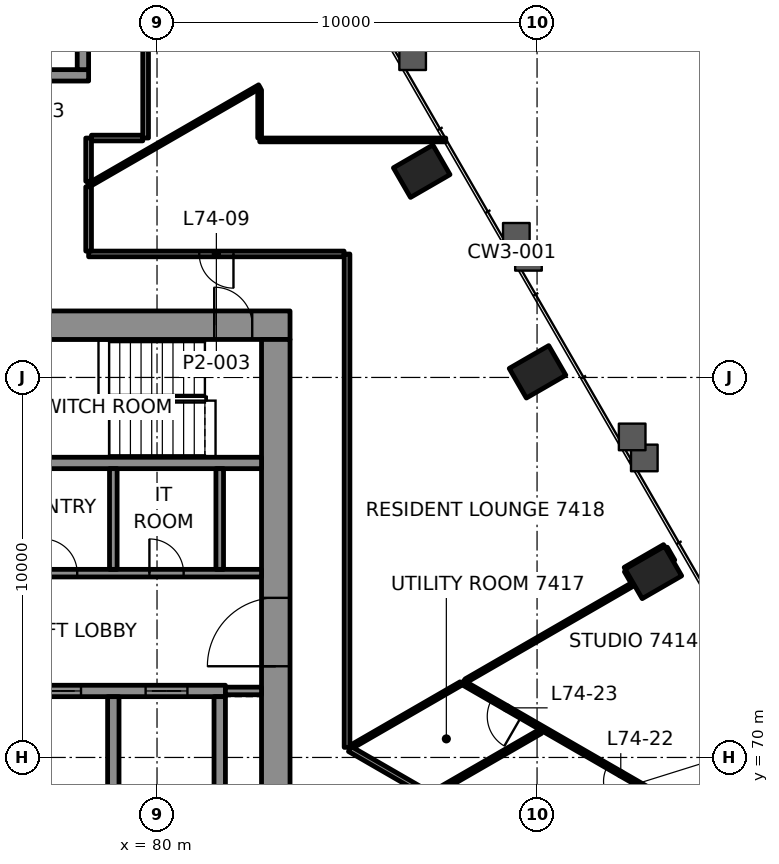
"""IFC4 building model, lengths in metres.
Left out: names, types, materials, properties, quantities, classifications, styles, units other than length and angle.
Written with IfcOpenShell. Run it as: python <this file> out.ifc"""

import sys

from ifc_helpers import new_model, si_unit, direction, frame, frame_2d, origin, origin_2d, place, context, subcontext, project, spatial, rectangle, hollow_rectangle, extrude, element, fill, save


model = new_model("IFC4")
c1 = context("Model", 3, precision=1e-05, world=origin(), true_north=direction((0.0, 1.0)))
c2 = subcontext(c1, "Body", "Model", "MODEL_VIEW")
j1 = project(units=[si_unit("LENGTHUNIT", "METRE"), si_unit("PLANEANGLEUNIT", "RADIAN")], contexts=[c1])
p1 = place(None, origin())
s1 = spatial("IfcSite", under=j1, at=p1, CompositionType="ELEMENT")
p2 = place(p1, origin())
s2 = spatial("IfcBuilding", under=s1, at=p2, CompositionType="ELEMENT")
p3 = place(p2, frame((0.0, 0.0, 305.6)))
s3 = spatial("IfcBuildingStorey", under=s2, at=p3, CompositionType="ELEMENT", Elevation=305.6)
for number, where, z_axis, x_axis in (
    (1, (93.061, 74.869, -0.0), (0.0, 0.0, 1.0), (-0.5, 0.866, 0.0)),
    (2, (90.013, 80.148, -0.0), (0.0, 0.0, 1.0), (-0.5, 0.866, 0.0)),
    (3, (86.965, 85.427, -0.0), (0.0, 0.0, 1.0), (-0.5, 0.866, 0.0)),
):
    element("IfcColumn", number, at=place(p3, frame(where, z_axis=z_axis, x_axis=x_axis)), inside=s3, PredefinedType="COLUMN", context=c2, shape_type="SweptSolid", body=[
        extrude(hollow_rectangle(XDim=0.9, YDim=1.2, WallThickness=0.06, at=origin_2d()), origin(), (0.0, 0.0, 1.0), 3.5),
    ])
p4 = place(p3, frame((66.5, 81.375, 0.0), z_axis=(0.0, 0.0, 1.0), x_axis=(1.0, 0.0, 0.0)))
e4 = element("IfcWall", 4, at=p4, inside=s3, PredefinedType="SHEAR", context=c2, shape_type="SweptSolid", body=[
    extrude(rectangle(XDim=17.0, YDim=0.75, at=frame_2d((8.5, 0.0))), origin(), (0.0, 0.0, 1.0), 3.3),
])
p5 = place(p4, frame((1.195, 0.0, 0.0)))
e5 = element("IfcOpeningElement", 5, at=p5, cuts=e4, PredefinedType="OPENING", context=c2, shape_type="SweptSolid", body=[
    extrude(rectangle(XDim=1.0, YDim=2.1, at=frame_2d((0.5, 1.05))), frame((0.0, 0.385, 0.0), z_axis=(0.0, -1.0, 0.0), x_axis=(1.0, 0.0, 0.0)), (0.0, 0.0, 1.0), 0.77),
])
p6 = place(p4, frame((15.005, 0.0, 0.0)))
e6 = element("IfcOpeningElement", 6, at=p6, cuts=e4, PredefinedType="OPENING", context=c2, shape_type="SweptSolid", body=[
    extrude(rectangle(XDim=1.0, YDim=2.1, at=frame_2d((0.5, 1.05))), frame((0.0, 0.385, 0.0), z_axis=(0.0, -1.0, 0.0), x_axis=(1.0, 0.0, 0.0)), (0.0, 0.0, 1.0), 0.77),
])
p7 = place(p4, frame((8.15, 0.0, 0.0)))
e7 = element("IfcOpeningElement", 7, at=p7, cuts=e4, PredefinedType="OPENING", context=c2, shape_type="SweptSolid", body=[
    extrude(rectangle(XDim=0.9, YDim=2.1, at=frame_2d((0.45, 1.05))), frame((0.0, 0.385, 0.0), z_axis=(0.0, -1.0, 0.0), x_axis=(1.0, 0.0, 0.0)), (0.0, 0.0, 1.0), 0.77),
])
p8 = place(p3, frame((83.125, 69.0, 0.0), z_axis=(0.0, 0.0, 1.0), x_axis=(0.0, 1.0, 0.0)))
e8 = element("IfcWall", 8, at=p8, inside=s3, PredefinedType="SHEAR", context=c2, shape_type="SweptSolid", body=[
    extrude(rectangle(XDim=12.0, YDim=0.75, at=frame_2d((6.0, 0.0))), origin(), (0.0, 0.0, 1.0), 3.3),
])
p9 = place(p8, frame((3.4, 0.0, 0.0)))
e9 = element("IfcOpeningElement", 9, at=p9, cuts=e8, PredefinedType="OPENING", context=c2, shape_type="SweptSolid", body=[
    extrude(rectangle(XDim=1.8, YDim=2.1, at=frame_2d((0.9, 1.05))), frame((0.0, 0.385, 0.0), z_axis=(0.0, -1.0, 0.0), x_axis=(1.0, 0.0, 0.0)), (0.0, 0.0, 1.0), 0.77),
])
p10 = place(p3, frame((70.3, 71.75, 0.0), z_axis=(0.0, 0.0, 1.0), x_axis=(1.0, 0.0, 0.0)))
e10 = element("IfcWall", 10, at=p10, inside=s3, PredefinedType="SHEAR", context=c2, shape_type="SweptSolid", body=[
    extrude(rectangle(XDim=11.5, YDim=0.3, at=frame_2d((5.75, 0.0))), origin(), (0.0, 0.0, 1.0), 3.3),
])
p11 = place(p10, frame((1.0, 0.0, 0.0)))
e11 = element("IfcOpeningElement", 11, at=p11, cuts=e10, PredefinedType="OPENING", context=c2, shape_type="SweptSolid", body=[
    extrude(rectangle(XDim=1.1, YDim=2.1, at=frame_2d((0.55, 1.05))), frame((0.0, 0.16, 0.0), z_axis=(0.0, -1.0, 0.0), x_axis=(1.0, 0.0, 0.0)), (0.0, 0.0, 1.0), 0.32),
])
p12 = place(p10, frame((3.8, 0.0, 0.0)))
e12 = element("IfcOpeningElement", 12, at=p12, cuts=e10, PredefinedType="OPENING", context=c2, shape_type="SweptSolid", body=[
    extrude(rectangle(XDim=1.1, YDim=2.1, at=frame_2d((0.55, 1.05))), frame((0.0, 0.16, 0.0), z_axis=(0.0, -1.0, 0.0), x_axis=(1.0, 0.0, 0.0)), (0.0, 0.0, 1.0), 0.32),
])
p13 = place(p10, frame((6.6, 0.0, 0.0)))
e13 = element("IfcOpeningElement", 13, at=p13, cuts=e10, PredefinedType="OPENING", context=c2, shape_type="SweptSolid", body=[
    extrude(rectangle(XDim=1.1, YDim=2.1, at=frame_2d((0.55, 1.05))), frame((0.0, 0.16, 0.0), z_axis=(0.0, -1.0, 0.0), x_axis=(1.0, 0.0, 0.0)), (0.0, 0.0, 1.0), 0.32),
])
p14 = place(p10, frame((9.4, 0.0, 0.0)))
e14 = element("IfcOpeningElement", 14, at=p14, cuts=e10, PredefinedType="OPENING", context=c2, shape_type="SweptSolid", body=[
    extrude(rectangle(XDim=1.1, YDim=2.1, at=frame_2d((0.55, 1.05))), frame((0.0, 0.16, 0.0), z_axis=(0.0, -1.0, 0.0), x_axis=(1.0, 0.0, 0.0)), (0.0, 0.0, 1.0), 0.32),
])
for number, where, z_axis, x_axis in (
    (15, (78.85, 69.0, 0.0), (0.0, 0.0, 1.0), (0.0, 1.0, 0.0)),
    (16, (81.65, 69.0, 0.0), (0.0, 0.0, 1.0), (0.0, 1.0, 0.0)),
):
    element("IfcWall", number, at=place(p3, frame(where, z_axis=z_axis, x_axis=x_axis)), inside=s3, PredefinedType="SHEAR", context=c2, shape_type="SweptSolid", body=[
        extrude(rectangle(XDim=2.6, YDim=0.3, at=frame_2d((1.3, 0.0))), origin(), (0.0, 0.0, 1.0), 3.3),
    ])
p15 = place(p3, frame((67.25, 77.75, 0.0), z_axis=(0.0, 0.0, 1.0), x_axis=(1.0, 0.0, 0.0)))
e17 = element("IfcWall", 17, at=p15, inside=s3, PredefinedType="SHEAR", context=c2, shape_type="SweptSolid", body=[
    extrude(rectangle(XDim=15.5, YDim=0.3, at=frame_2d((7.75, 0.0))), origin(), (0.0, 0.0, 1.0), 3.3),
])
p16 = place(p15, frame((0.445, 0.0, 0.0)))
e18 = element("IfcOpeningElement", 18, at=p16, cuts=e17, PredefinedType="OPENING", context=c2, shape_type="SweptSolid", body=[
    extrude(rectangle(XDim=1.0, YDim=2.1, at=frame_2d((0.5, 1.05))), frame((0.0, 0.16, 0.0), z_axis=(0.0, -1.0, 0.0), x_axis=(1.0, 0.0, 0.0)), (0.0, 0.0, 1.0), 0.32),
])
p17 = place(p3, frame((71.8, 87.95, 0.0), z_axis=(0.0, 0.0, 1.0), x_axis=(1.0, 0.0, 0.0)))
e19 = element("IfcWall", 19, at=p17, inside=s3, PredefinedType="SHEAR", context=c2, shape_type="SweptSolid", body=[
    extrude(rectangle(XDim=6.4, YDim=0.3, at=frame_2d((3.2, 0.0))), origin(), (0.0, 0.0, 1.0), 3.3),
])
p18 = place(p17, frame((1.325, 0.0, 0.0)))
e20 = element("IfcOpeningElement", 20, at=p18, cuts=e19, PredefinedType="OPENING", context=c2, shape_type="SweptSolid", body=[
    extrude(rectangle(XDim=1.0, YDim=2.1, at=frame_2d((0.5, 1.05))), frame((0.0, 0.16, 0.0), z_axis=(0.0, -1.0, 0.0), x_axis=(1.0, 0.0, 0.0)), (0.0, 0.0, 1.0), 0.32),
])
p19 = place(p17, frame((4.125, 0.0, 0.0)))
e21 = element("IfcOpeningElement", 21, at=p19, cuts=e19, PredefinedType="OPENING", context=c2, shape_type="SweptSolid", body=[
    extrude(rectangle(XDim=1.2, YDim=2.1, at=frame_2d((0.6, 1.05))), frame((0.0, 0.16, 0.0), z_axis=(0.0, -1.0, 0.0), x_axis=(1.0, 0.0, 0.0)), (0.0, 0.0, 1.0), 0.32),
])
p20 = place(p3, frame((78.05, 88.1, 0.0), z_axis=(0.0, 0.0, 1.0), x_axis=(0.0, 1.0, 0.0)))
e22 = element("IfcWall", 22, at=p20, inside=s3, PredefinedType="SHEAR", context=c2, shape_type="SweptSolid", body=[
    extrude(rectangle(XDim=6.2, YDim=0.3, at=frame_2d((3.1, 0.0))), origin(), (0.0, 0.0, 1.0), 3.3),
])
p21 = place(p3, frame((84.923, 83.25, 0.0), z_axis=(0.0, 0.0, 1.0), x_axis=(-1.0, 0.0, 0.0)))
e23 = element("IfcWall", 23, at=p21, inside=s3, PredefinedType="PARTITIONING", context=c2, shape_type="SweptSolid", body=[
    extrude(rectangle(XDim=6.723, YDim=0.15, at=frame_2d((3.362, 0.0))), origin(), (0.0, 0.0, 1.0), 2.7),
])
p22 = place(p21, frame((2.911, 0.0, 0.0)))
e24 = element("IfcOpeningElement", 24, at=p22, cuts=e23, PredefinedType="OPENING", context=c2, shape_type="SweptSolid", body=[
    extrude(rectangle(XDim=0.9, YDim=2.1, at=frame_2d((0.45, 1.05))), frame((0.0, 0.085, 0.0), z_axis=(0.0, -1.0, 0.0), x_axis=(1.0, 0.0, 0.0)), (0.0, 0.0, 1.0), 0.17),
])
p23 = place(p3, frame((82.702, 86.25, 0.0), z_axis=(0.0, 0.0, 1.0), x_axis=(1.0, 0.0, 0.0)))
e25 = element("IfcWall", 25, at=p23, inside=s3, PredefinedType="PARTITIONING", context=c2, shape_type="SweptSolid", body=[
    extrude(rectangle(XDim=4.896, YDim=0.1, at=frame_2d((2.448, 0.0))), origin(), (0.0, 0.0, 1.0), 2.688),
])
p24 = place(p3, frame((78.275, 86.3, 0.0), z_axis=(0.0, 0.0, 1.0), x_axis=(1.0, 0.0, 0.0)))
e26 = element("IfcWall", 26, at=p24, inside=s3, PredefinedType="PARTITIONING", context=c2, shape_type="SweptSolid", body=[
    extrude(rectangle(XDim=1.35, YDim=0.15, at=frame_2d((0.675, 0.0))), origin(), (0.0, 0.0, 1.0), 2.7),
])
p25 = place(p3, frame((87.292, 69.069, 0.0), z_axis=(0.0, 0.0, 1.0), x_axis=(0.86605210011, 0.499953757757, 0.0)))
e27 = element("IfcWall", 27, at=p25, inside=s3, PredefinedType="PARTITIONING", context=c2, shape_type="SweptSolid", body=[
    extrude(rectangle(XDim=3.228, YDim=0.12, at=frame_2d((1.614, 0.0))), origin(), (0.0, 0.0, 1.0), 2.7),
])
p26 = place(p3, frame((85.145, 70.299, 0.0), z_axis=(0.0, 0.0, 1.0), x_axis=(0.866032610133, 0.499987518031, 0.0)))
e28 = element("IfcWall", 28, at=p26, inside=s3, PredefinedType="PARTITIONING", context=c2, shape_type="SweptSolid", body=[
    extrude(rectangle(XDim=3.295, YDim=0.1, at=frame_2d((1.648, 0.0))), origin(), (0.0, 0.0, 1.0), 2.7),
])
p27 = place(p3, frame((92.318, 74.959, 0.0), z_axis=(0.0, 0.0, 1.0), x_axis=(0.866087020037, 0.499893262331, 0.0)))
e29 = element("IfcWall", 29, at=p27, inside=s3, PredefinedType="PARTITIONING", context=c2, shape_type="SweptSolid", body=[
    extrude(rectangle(XDim=1.196, YDim=0.1, at=frame_2d((0.598, 0.0))), origin(), (0.0, 0.0, 1.0), 2.688),
])
p28 = place(p3, frame((78.2, 85.06, 0.0), z_axis=(0.0, 0.0, 1.0), x_axis=(0.866025161861, 0.500000419024, 0.0)))
e30 = element("IfcWall", 30, at=p28, inside=s3, PredefinedType="PARTITIONING", context=c2, shape_type="SweptSolid", body=[
    extrude(rectangle(XDim=5.195, YDim=0.1, at=frame_2d((2.598, 0.0))), origin(), (0.0, 0.0, 1.0), 2.7),
])
p29 = place(p3, frame((85.0, 70.266, 0.0), z_axis=(0.0, 0.0, 1.0), x_axis=(0.0, 1.0, 0.0)))
e31 = element("IfcWall", 31, at=p29, inside=s3, PredefinedType="PARTITIONING", context=c2, shape_type="SweptSolid", body=[
    extrude(rectangle(XDim=12.982, YDim=0.15, at=frame_2d((6.491, 0.0))), origin(), (0.0, 0.0, 1.0), 2.7),
])
p30 = place(p3, frame((82.7, 86.302, 0.0), z_axis=(0.0, 0.0, 1.0), x_axis=(0.0, 1.0, 0.0)))
e32 = element("IfcWall", 32, at=p30, inside=s3, PredefinedType="PARTITIONING", context=c2, shape_type="SweptSolid", body=[
    extrude(rectangle(XDim=1.267, YDim=0.1, at=frame_2d((0.634, 0.0))), origin(), (0.0, 0.0, 1.0), 2.7),
])
p31 = place(p3, frame((79.7, 86.301, 0.0), z_axis=(0.0, 0.0, 1.0), x_axis=(0.0, 1.0, 0.0)))
e33 = element("IfcWall", 33, at=p31, inside=s3, PredefinedType="PARTITIONING", context=c2, shape_type="SweptSolid", body=[
    extrude(rectangle(XDim=9.799, YDim=0.15, at=frame_2d((4.899, 0.0))), origin(), (0.0, 0.0, 1.0), 2.7),
])
p32 = place(p3, frame((78.2, 83.325, 0.0), z_axis=(0.0, 0.0, 1.0), x_axis=(0.0, 1.0, 0.0)))
e34 = element("IfcWall", 34, at=p32, inside=s3, PredefinedType="PARTITIONING", context=c2, shape_type="SweptSolid", body=[
    extrude(rectangle(XDim=1.692, YDim=0.15, at=frame_2d((0.846, 0.0))), origin(), (0.0, 0.0, 1.0), 2.7),
])
p33 = place(p3, frame((93.58, 75.169, 0.0), z_axis=(0.0, 0.0, 1.0), x_axis=(-0.500153222552, 0.865936922628, 0.0)))
e35 = element("IfcWall", 35, at=p33, inside=s3, PredefinedType="PARTITIONING", context=c2, shape_type="SweptSolid", body=[
    extrude(rectangle(XDim=0.393, YDim=0.1, at=frame_2d((0.196, 0.0))), origin(), (0.0, 0.0, 1.0), 2.7),
])
p34 = place(p3, frame((92.511, 74.621, 0.0), z_axis=(0.0, 0.0, 1.0), x_axis=(-0.499868360126, 0.866101392762, 0.0)))
e36 = element("IfcWall", 36, at=p34, inside=s3, PredefinedType="PARTITIONING", context=c2, shape_type="SweptSolid", body=[
    extrude(rectangle(XDim=0.338, YDim=0.1, at=frame_2d((0.169, 0.0))), origin(), (0.0, 0.0, 1.0), 2.7),
])
p35 = place(p3, frame((99.74, 65.22, 0.0), z_axis=(0.0, 0.0, 1.0), x_axis=(-0.866029646425, 0.499992651459, 0.0)))
e37 = element("IfcWall", 37, at=p35, inside=s3, PredefinedType="PARTITIONING", context=c2, shape_type="SweptSolid", body=[
    extrude(rectangle(XDim=13.505, YDim=0.12, at=frame_2d((6.752, 0.0))), origin(), (0.0, 0.0, 1.0), 2.7),
])
p36 = place(p35, frame((3.197, 0.0, 0.0)))
e38 = element("IfcOpeningElement", 38, at=p36, cuts=e37, PredefinedType="OPENING", context=c2, shape_type="SweptSolid", body=[
    extrude(rectangle(XDim=0.9, YDim=2.1, at=frame_2d((0.45, 1.05))), frame((0.0, 0.07, 0.0), z_axis=(0.0, -1.0, 0.0), x_axis=(1.0, 0.0, 0.0)), (0.0, 0.0, 1.0), 0.14),
])
p37 = place(p35, frame((8.303, 0.0, 0.0)))
e39 = element("IfcOpeningElement", 39, at=p37, cuts=e37, PredefinedType="OPENING", context=c2, shape_type="SweptSolid", body=[
    extrude(rectangle(XDim=0.8, YDim=2.1, at=frame_2d((0.4, 1.05))), frame((0.0, 0.07, 0.0), z_axis=(0.0, -1.0, 0.0), x_axis=(1.0, 0.0, 0.0)), (0.0, 0.0, 1.0), 0.14),
])
p38 = place(p35, frame((11.721, 0.0, 0.0)))
e40 = element("IfcOpeningElement", 40, at=p38, cuts=e37, PredefinedType="OPENING", context=c2, shape_type="SweptSolid", body=[
    extrude(rectangle(XDim=0.9, YDim=2.1, at=frame_2d((0.45, 1.05))), frame((0.0, 0.07, 0.0), z_axis=(0.0, -1.0, 0.0), x_axis=(1.0, 0.0, 0.0)), (0.0, 0.0, 1.0), 0.14),
])
p39 = place(p3, frame((85.075, 70.222, 0.0), z_axis=(0.0, 0.0, 1.0), x_axis=(0.866023935413, -0.500002543286, 0.0)))
e41 = element("IfcWall", 41, at=p39, inside=s3, PredefinedType="PARTITIONING", context=c2, shape_type="SweptSolid", body=[
    extrude(rectangle(XDim=12.601, YDim=0.15, at=frame_2d((6.3, 0.0))), origin(), (0.0, 0.0, 1.0), 2.7),
])
p40 = place(p39, frame((9.249, 0.0, 0.0)))
e42 = element("IfcOpeningElement", 42, at=p40, cuts=e41, PredefinedType="OPENING", context=c2, shape_type="SweptSolid", body=[
    extrude(rectangle(XDim=1.0, YDim=2.1, at=frame_2d((0.5, 1.05))), frame((0.0, 0.085, 0.0), z_axis=(0.0, -1.0, 0.0), x_axis=(1.0, 0.0, 0.0)), (0.0, 0.0, 1.0), 0.17),
])
p41 = place(p3, frame((88.129, 72.021, 0.0), z_axis=(0.0, 0.0, 1.0), x_axis=(0.866010809447, 0.500025277282, 0.0)))
e43 = element("IfcWall", 43, at=p41, inside=s3, PredefinedType="PARTITIONING", context=c2, shape_type="SweptSolid", body=[
    extrude(rectangle(XDim=5.094, YDim=0.1, at=frame_2d((2.547, 0.0))), origin(), (0.0, 0.0, 1.0), 2.7),
])
p42 = place(p3, frame((78.2, 85.161, 0.0), z_axis=(0.0, 0.0, 1.0), x_axis=(0.0, 1.0, 0.0)))
e44 = element("IfcWall", 44, at=p42, inside=s3, PredefinedType="PARTITIONING", context=c2, shape_type="SweptSolid", body=[
    extrude(rectangle(XDim=1.139, YDim=0.15, at=frame_2d((0.57, 0.0))), origin(), (0.0, 0.0, 1.0), 2.7),
])
p43 = place(p3, frame((81.8, 71.75, 0.0), z_axis=(0.0, 0.0, 1.0), x_axis=(1.0, 0.0, 0.0)))
e45 = element("IfcWall", 45, at=p43, inside=s3, PredefinedType="PARTITIONING", context=c2, shape_type="SweptSolid", body=[
    extrude(rectangle(XDim=0.95, YDim=0.2, at=frame_2d((0.475, 0.0))), origin(), (0.0, 0.0, 1.0), 3.3),
])
p44 = place(p3, frame((76.2, 74.85, 0.0), z_axis=(0.0, 0.0, 1.0), x_axis=(1.0, 0.0, 0.0)))
e46 = element("IfcWall", 46, at=p44, inside=s3, PredefinedType="PARTITIONING", context=c2, shape_type="SweptSolid", body=[
    extrude(rectangle(XDim=6.55, YDim=0.2, at=frame_2d((3.275, 0.0))), origin(), (0.0, 0.0, 1.0), 3.3),
])
p45 = place(p44, frame((0.8, 0.0, 0.0)))
e47 = element("IfcOpeningElement", 47, at=p45, cuts=e46, PredefinedType="OPENING", context=c2, shape_type="SweptSolid", body=[
    extrude(rectangle(XDim=0.9, YDim=2.1, at=frame_2d((0.45, 1.05))), frame((0.0, 0.11, 0.0), z_axis=(0.0, -1.0, 0.0), x_axis=(1.0, 0.0, 0.0)), (0.0, 0.0, 1.0), 0.22),
])
p46 = place(p44, frame((3.6, 0.0, 0.0)))
e48 = element("IfcOpeningElement", 48, at=p46, cuts=e46, PredefinedType="OPENING", context=c2, shape_type="SweptSolid", body=[
    extrude(rectangle(XDim=0.9, YDim=2.1, at=frame_2d((0.45, 1.05))), frame((0.0, 0.11, 0.0), z_axis=(0.0, -1.0, 0.0), x_axis=(1.0, 0.0, 0.0)), (0.0, 0.0, 1.0), 0.22),
])
for number, where, z_axis, x_axis in (
    (49, (78.85, 74.95, 0.0), (0.0, 0.0, 1.0), (0.0, 1.0, 0.0)),
    (50, (81.65, 74.95, 0.0), (0.0, 0.0, 1.0), (0.0, 1.0, 0.0)),
):
    element("IfcWall", number, at=place(p3, frame(where, z_axis=z_axis, x_axis=x_axis)), inside=s3, PredefinedType="PARTITIONING", context=c2, shape_type="SweptSolid", body=[
        extrude(rectangle(XDim=2.65, YDim=0.2, at=frame_2d((1.325, 0.0))), origin(), (0.0, 0.0, 1.0), 3.3),
    ])
p47 = place(p22, origin())
e51 = element("IfcDoor", 51, at=p47, inside=s3, OperationType="SINGLE_SWING_RIGHT", PredefinedType="DOOR", context=c2, shape_type="SweptSolid", body=[
    extrude(rectangle(XDim=0.9, YDim=2.1, at=frame_2d((0.45, 1.05))), frame((0.0, 0.025, 0.0), z_axis=(0.0, -1.0, 0.0), x_axis=(1.0, 0.0, 0.0)), (0.0, 0.0, 1.0), 0.05),
])
fill(e24, e51)
p48 = place(p37, origin())
e52 = element("IfcDoor", 52, at=p48, inside=s3, OperationType="SINGLE_SWING_RIGHT", PredefinedType="DOOR", context=c2, shape_type="SweptSolid", body=[
    extrude(rectangle(XDim=0.8, YDim=2.1, at=frame_2d((0.4, 1.05))), frame((0.0, 0.025, 0.0), z_axis=(0.0, -1.0, 0.0), x_axis=(1.0, 0.0, 0.0)), (0.0, 0.0, 1.0), 0.05),
])
fill(e39, e52)
p49 = place(p38, origin())
e53 = element("IfcDoor", 53, at=p49, inside=s3, OperationType="SINGLE_SWING_LEFT", PredefinedType="DOOR", context=c2, shape_type="SweptSolid", body=[
    extrude(rectangle(XDim=0.9, YDim=2.1, at=frame_2d((0.45, 1.05))), frame((0.0, 0.025, 0.0), z_axis=(0.0, -1.0, 0.0), x_axis=(1.0, 0.0, 0.0)), (0.0, 0.0, 1.0), 0.05),
])
fill(e40, e53)
p50 = place(p13, origin())
e54 = element("IfcDoor", 54, at=p50, inside=s3, OperationType="DOUBLE_DOOR_SLIDING", PredefinedType="DOOR", context=c2, shape_type="SweptSolid", body=[
    extrude(rectangle(XDim=1.1, YDim=2.1, at=frame_2d((0.55, 1.05))), frame((0.0, 0.025, 0.0), z_axis=(0.0, -1.0, 0.0), x_axis=(1.0, 0.0, 0.0)), (0.0, 0.0, 1.0), 0.05),
])
fill(e13, e54)
p51 = place(p14, origin())
e55 = element("IfcDoor", 55, at=p51, inside=s3, OperationType="DOUBLE_DOOR_SLIDING", PredefinedType="DOOR", context=c2, shape_type="SweptSolid", body=[
    extrude(rectangle(XDim=1.1, YDim=2.1, at=frame_2d((0.55, 1.05))), frame((0.0, 0.025, 0.0), z_axis=(0.0, -1.0, 0.0), x_axis=(1.0, 0.0, 0.0)), (0.0, 0.0, 1.0), 0.05),
])
fill(e14, e55)
p52 = place(p6, origin())
e56 = element("IfcDoor", 56, at=p52, inside=s3, OperationType="SINGLE_SWING_LEFT", PredefinedType="DOOR", context=c2, shape_type="SweptSolid", body=[
    extrude(rectangle(XDim=1.0, YDim=2.1, at=frame_2d((0.5, 1.05))), frame((0.0, 0.095, 0.0), z_axis=(0.0, -1.0, 0.0), x_axis=(1.0, 0.0, 0.0)), (0.0, 0.0, 1.0), 0.19),
])
fill(e6, e56)
p53 = place(p9, origin())
e57 = element("IfcDoor", 57, at=p53, inside=s3, OperationType="SINGLE_SWING_LEFT", PredefinedType="DOOR", context=c2, shape_type="SweptSolid", body=[
    extrude(rectangle(XDim=1.8, YDim=2.1, at=frame_2d((0.9, 1.05))), frame((0.0, 0.095, 0.0), z_axis=(0.0, -1.0, 0.0), x_axis=(1.0, 0.0, 0.0)), (0.0, 0.0, 1.0), 0.19),
])
fill(e9, e57)
p54 = place(p45, origin())
e58 = element("IfcDoor", 58, at=p54, inside=s3, OperationType="SINGLE_SWING_RIGHT", PredefinedType="DOOR", context=c2, shape_type="SweptSolid", body=[
    extrude(rectangle(XDim=0.9, YDim=2.1, at=frame_2d((0.45, 1.05))), frame((0.0, 0.025, 0.0), z_axis=(0.0, -1.0, 0.0), x_axis=(1.0, 0.0, 0.0)), (0.0, 0.0, 1.0), 0.05),
])
fill(e47, e58)
p55 = place(p46, origin())
e59 = element("IfcDoor", 59, at=p55, inside=s3, OperationType="SINGLE_SWING_LEFT", PredefinedType="DOOR", context=c2, shape_type="SweptSolid", body=[
    extrude(rectangle(XDim=0.9, YDim=2.1, at=frame_2d((0.45, 1.05))), frame((0.0, 0.025, 0.0), z_axis=(0.0, -1.0, 0.0), x_axis=(1.0, 0.0, 0.0)), (0.0, 0.0, 1.0), 0.05),
])
fill(e48, e59)
save(model, sys.argv[1])
